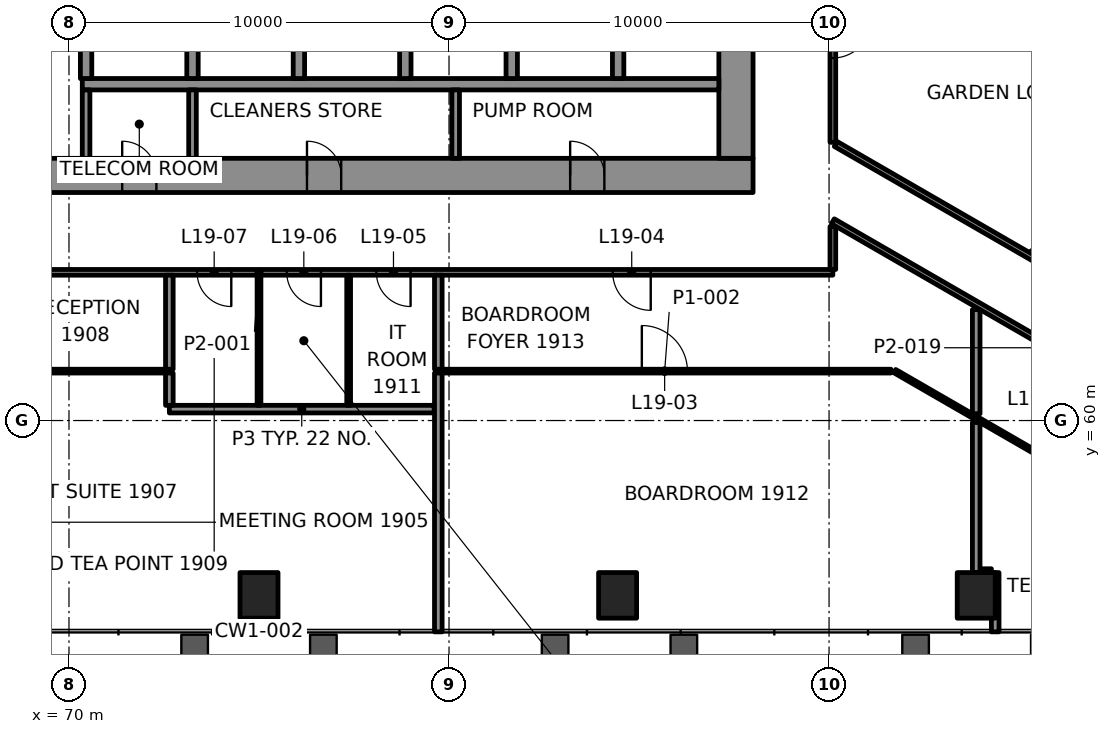
"""IFC4 building model, lengths in metres.
Left out: names, types, materials, properties, quantities, classifications, styles, units other than length and angle.
Written with IfcOpenShell. Run it as: python <this file> out.ifc"""

import sys

from ifc_helpers import new_model, si_unit, direction, frame, frame_2d, origin, origin_2d, place, context, subcontext, project, spatial, rectangle, extrude, element, fill, save


model = new_model("IFC4")
c1 = context("Model", 3, precision=1e-05, world=origin(), true_north=direction((0.0, 1.0)))
c2 = subcontext(c1, "Body", "Model", "MODEL_VIEW")
j1 = project(units=[si_unit("LENGTHUNIT", "METRE"), si_unit("PLANEANGLEUNIT", "RADIAN")], contexts=[c1])
p1 = place(None, origin())
s1 = spatial("IfcSite", under=j1, at=p1, CompositionType="ELEMENT")
p2 = place(p1, origin())
s2 = spatial("IfcBuilding", under=s1, at=p2, CompositionType="ELEMENT")
p3 = place(p2, frame((0.0, 0.0, 86.2)))
s3 = spatial("IfcBuildingStorey", under=s2, at=p3, CompositionType="ELEMENT", Elevation=86.2)
for number, where, z_axis, x_axis in (
    (1, (75.0, 55.399, -0.0), (0.0, 0.0, 1.0), (1.0, 0.0, 0.0)),
    (2, (84.436, 55.399, -0.0), (0.0, 0.0, 1.0), (1.0, 0.0, 0.0)),
    (3, (93.872, 55.399, -0.0), (0.0, 0.0, 1.0), (1.0, 0.0, 0.0)),
):
    element("IfcColumn", number, at=place(p3, frame(where, z_axis=z_axis, x_axis=x_axis)), inside=s3, PredefinedType="COLUMN", context=c2, shape_type="SweptSolid", body=[
        extrude(rectangle(XDim=1.0, YDim=1.2, at=origin_2d()), origin(), (0.0, 0.0, 1.0), 4.2),
    ])
p4 = place(p3, frame((62.0, 66.45, 0.0), z_axis=(0.0, 0.0, 1.0), x_axis=(1.0, 0.0, 0.0)))
e4 = element("IfcWall", 4, at=p4, inside=s3, PredefinedType="SHEAR", context=c2, shape_type="SweptSolid", body=[
    extrude(rectangle(XDim=26.0, YDim=0.9, at=frame_2d((13.0, 0.0))), origin(), (0.0, 0.0, 1.0), 4.0),
])
p5 = place(p4, frame((3.45, 0.0, 0.0)))
e5 = element("IfcOpeningElement", 5, at=p5, cuts=e4, PredefinedType="OPENING", context=c2, shape_type="SweptSolid", body=[
    extrude(rectangle(XDim=0.9, YDim=2.1, at=frame_2d((0.45, 1.05))), frame((0.0, 0.46, 0.0), z_axis=(0.0, -1.0, 0.0), x_axis=(1.0, 0.0, 0.0)), (0.0, 0.0, 1.0), 0.92),
])
p6 = place(p4, frame((6.425, 0.0, 0.0)))
e6 = element("IfcOpeningElement", 6, at=p6, cuts=e4, PredefinedType="OPENING", context=c2, shape_type="SweptSolid", body=[
    extrude(rectangle(XDim=0.9, YDim=2.1, at=frame_2d((0.45, 1.05))), frame((0.0, 0.46, 0.0), z_axis=(0.0, -1.0, 0.0), x_axis=(1.0, 0.0, 0.0)), (0.0, 0.0, 1.0), 0.92),
])
p7 = place(p4, frame((9.4, 0.0, 0.0)))
e7 = element("IfcOpeningElement", 7, at=p7, cuts=e4, PredefinedType="OPENING", context=c2, shape_type="SweptSolid", body=[
    extrude(rectangle(XDim=0.9, YDim=2.1, at=frame_2d((0.45, 1.05))), frame((0.0, 0.46, 0.0), z_axis=(0.0, -1.0, 0.0), x_axis=(1.0, 0.0, 0.0)), (0.0, 0.0, 1.0), 0.92),
])
p8 = place(p4, frame((14.262, 0.0, 0.0)))
e8 = element("IfcOpeningElement", 8, at=p8, cuts=e4, PredefinedType="OPENING", context=c2, shape_type="SweptSolid", body=[
    extrude(rectangle(XDim=0.9, YDim=2.1, at=frame_2d((0.45, 1.05))), frame((0.0, 0.46, 0.0), z_axis=(0.0, -1.0, 0.0), x_axis=(1.0, 0.0, 0.0)), (0.0, 0.0, 1.0), 0.92),
])
p9 = place(p4, frame((21.188, 0.0, 0.0)))
e9 = element("IfcOpeningElement", 9, at=p9, cuts=e4, PredefinedType="OPENING", context=c2, shape_type="SweptSolid", body=[
    extrude(rectangle(XDim=0.9, YDim=2.1, at=frame_2d((0.45, 1.05))), frame((0.0, 0.46, 0.0), z_axis=(0.0, -1.0, 0.0), x_axis=(1.0, 0.0, 0.0)), (0.0, 0.0, 1.0), 0.92),
])
p10 = place(p3, frame((87.55, 66.9, 0.0), z_axis=(0.0, 0.0, 1.0), x_axis=(0.0, 1.0, 0.0)))
e10 = element("IfcWall", 10, at=p10, inside=s3, PredefinedType="SHEAR", context=c2, shape_type="SweptSolid", body=[
    extrude(rectangle(XDim=16.2, YDim=0.9, at=frame_2d((8.1, 0.0))), origin(), (0.0, 0.0, 1.0), 4.0),
])
p11 = place(p10, frame((5.5, 0.0, 0.0)))
e11 = element("IfcOpeningElement", 11, at=p11, cuts=e10, PredefinedType="OPENING", context=c2, shape_type="SweptSolid", body=[
    extrude(rectangle(XDim=1.8, YDim=2.1, at=frame_2d((0.9, 1.05))), frame((0.0, 0.46, 0.0), z_axis=(0.0, -1.0, 0.0), x_axis=(1.0, 0.0, 0.0)), (0.0, 0.0, 1.0), 0.92),
])
p12 = place(p10, frame((11.738, 0.0, 0.0)))
e12 = element("IfcOpeningElement", 12, at=p12, cuts=e10, PredefinedType="OPENING", context=c2, shape_type="SweptSolid", body=[
    extrude(rectangle(XDim=0.9, YDim=2.1, at=frame_2d((0.45, 1.05))), frame((0.0, 0.46, 0.0), z_axis=(0.0, -1.0, 0.0), x_axis=(1.0, 0.0, 0.0)), (0.0, 0.0, 1.0), 0.92),
])
p13 = place(p3, frame((70.35, 68.85, 0.0), z_axis=(0.0, 0.0, 1.0), x_axis=(1.0, 0.0, 0.0)))
e13 = element("IfcWall", 13, at=p13, inside=s3, PredefinedType="SHEAR", context=c2, shape_type="SweptSolid", body=[
    extrude(rectangle(XDim=16.75, YDim=0.3, at=frame_2d((8.375, 0.0))), origin(), (0.0, 0.0, 1.0), 4.0),
])
for number, where, z_axis, x_axis in (
    (14, (70.45, 69.0, 0.0), (0.0, 0.0, 1.0), (0.0, 1.0, 0.0)),
    (15, (73.25, 69.0, 0.0), (0.0, 0.0, 1.0), (0.0, 1.0, 0.0)),
    (16, (76.05, 69.0, 0.0), (0.0, 0.0, 1.0), (0.0, 1.0, 0.0)),
    (17, (78.85, 69.0, 0.0), (0.0, 0.0, 1.0), (0.0, 1.0, 0.0)),
    (18, (81.65, 69.0, 0.0), (0.0, 0.0, 1.0), (0.0, 1.0, 0.0)),
    (19, (84.45, 69.0, 0.0), (0.0, 0.0, 1.0), (0.0, 1.0, 0.0)),
):
    element("IfcWall", number, at=place(p3, frame(where, z_axis=z_axis, x_axis=x_axis)), inside=s3, PredefinedType="SHEAR", context=c2, shape_type="SweptSolid", body=[
        extrude(rectangle(XDim=2.6, YDim=0.3, at=frame_2d((1.3, 0.0))), origin(), (0.0, 0.0, 1.0), 4.0),
    ])
p14 = place(p3, frame((93.972, 55.999, 0.0), z_axis=(0.0, 0.0, 1.0), x_axis=(1.0, 0.0, 0.0)))
e20 = element("IfcWall", 20, at=p14, inside=s3, PredefinedType="PARTITIONING", context=c2, shape_type="SweptSolid", body=[
    extrude(rectangle(XDim=0.299, YDim=0.2, at=frame_2d((0.15, 0.0))), origin(), (0.0, 0.0, 1.0), 3.4),
])
p15 = place(p3, frame((72.641, 60.3, 0.0), z_axis=(0.0, 0.0, 1.0), x_axis=(1.0, 0.0, 0.0)))
e21 = element("IfcWall", 21, at=p15, inside=s3, PredefinedType="PARTITIONING", context=c2, shape_type="SweptSolid", body=[
    extrude(rectangle(XDim=6.967, YDim=0.2, at=frame_2d((3.484, 0.0))), origin(), (0.0, 0.0, 1.0), 3.4),
])
p16 = place(p3, frame((58.271, 61.3, 0.0), z_axis=(0.0, 0.0, 1.0), x_axis=(1.0, 0.0, 0.0)))
e22 = element("IfcWall", 22, at=p16, inside=s3, PredefinedType="PARTITIONING", context=c2, shape_type="SweptSolid", body=[
    extrude(rectangle(XDim=14.37, YDim=0.1, at=frame_2d((7.185, 0.0))), origin(), (0.0, 0.0, 1.0), 3.4),
])
p17 = place(p16, frame((2.123, 0.0, 0.0)))
e23 = element("IfcOpeningElement", 23, at=p17, cuts=e22, PredefinedType="OPENING", context=c2, shape_type="SweptSolid", body=[
    extrude(rectangle(XDim=0.9, YDim=2.1, at=frame_2d((0.45, 1.05))), frame((0.0, 0.06, 0.0), z_axis=(0.0, -1.0, 0.0), x_axis=(1.0, 0.0, 0.0)), (0.0, 0.0, 1.0), 0.12),
])
p18 = place(p16, frame((9.052, 0.0, 0.0)))
e24 = element("IfcOpeningElement", 24, at=p18, cuts=e22, PredefinedType="OPENING", context=c2, shape_type="SweptSolid", body=[
    extrude(rectangle(XDim=1.0, YDim=2.1, at=frame_2d((0.5, 1.05))), frame((0.0, 0.06, 0.0), z_axis=(0.0, -1.0, 0.0), x_axis=(1.0, 0.0, 0.0)), (0.0, 0.0, 1.0), 0.12),
])
p19 = place(p3, frame((79.718, 61.3, 0.0), z_axis=(0.0, 0.0, 1.0), x_axis=(1.0, 0.0, 0.0)))
e25 = element("IfcWall", 25, at=p19, inside=s3, PredefinedType="PARTITIONING", context=c2, shape_type="SweptSolid", body=[
    extrude(rectangle(XDim=11.911, YDim=0.1, at=frame_2d((5.956, 0.0))), origin(), (0.0, 0.0, 1.0), 3.4),
])
p20 = place(p19, frame((5.355, 0.0, 0.0)))
e26 = element("IfcOpeningElement", 26, at=p20, cuts=e25, PredefinedType="OPENING", context=c2, shape_type="SweptSolid", body=[
    extrude(rectangle(XDim=1.2, YDim=2.1, at=frame_2d((0.6, 1.05))), frame((0.0, 0.06, 0.0), z_axis=(0.0, -1.0, 0.0), x_axis=(1.0, 0.0, 0.0)), (0.0, 0.0, 1.0), 0.12),
])
p21 = place(p3, frame((90.1, 63.9, 0.0), z_axis=(0.0, 0.0, 1.0), x_axis=(-1.0, 0.0, 0.0)))
e27 = element("IfcWall", 27, at=p21, inside=s3, PredefinedType="PARTITIONING", context=c2, shape_type="SweptSolid", body=[
    extrude(rectangle(XDim=30.2, YDim=0.15, at=frame_2d((15.1, 0.0))), origin(), (0.0, 0.0, 1.0), 3.4),
])
p22 = place(p21, frame((4.792, 0.0, 0.0)))
e28 = element("IfcOpeningElement", 28, at=p22, cuts=e27, PredefinedType="OPENING", context=c2, shape_type="SweptSolid", body=[
    extrude(rectangle(XDim=1.0, YDim=2.1, at=frame_2d((0.5, 1.05))), frame((0.0, 0.085, 0.0), z_axis=(0.0, -1.0, 0.0), x_axis=(1.0, 0.0, 0.0)), (0.0, 0.0, 1.0), 0.17),
])
p23 = place(p21, frame((11.111, 0.0, 0.0)))
e29 = element("IfcOpeningElement", 29, at=p23, cuts=e27, PredefinedType="OPENING", context=c2, shape_type="SweptSolid", body=[
    extrude(rectangle(XDim=0.9, YDim=2.1, at=frame_2d((0.45, 1.05))), frame((0.0, 0.085, 0.0), z_axis=(0.0, -1.0, 0.0), x_axis=(1.0, 0.0, 0.0)), (0.0, 0.0, 1.0), 0.17),
])
p24 = place(p21, frame((13.47, 0.0, 0.0)))
e30 = element("IfcOpeningElement", 30, at=p24, cuts=e27, PredefinedType="OPENING", context=c2, shape_type="SweptSolid", body=[
    extrude(rectangle(XDim=0.9, YDim=2.1, at=frame_2d((0.45, 1.05))), frame((0.0, 0.085, 0.0), z_axis=(0.0, -1.0, 0.0), x_axis=(1.0, 0.0, 0.0)), (0.0, 0.0, 1.0), 0.17),
])
p25 = place(p21, frame((15.83, 0.0, 0.0)))
e31 = element("IfcOpeningElement", 31, at=p25, cuts=e27, PredefinedType="OPENING", context=c2, shape_type="SweptSolid", body=[
    extrude(rectangle(XDim=0.9, YDim=2.1, at=frame_2d((0.45, 1.05))), frame((0.0, 0.085, 0.0), z_axis=(0.0, -1.0, 0.0), x_axis=(1.0, 0.0, 0.0)), (0.0, 0.0, 1.0), 0.17),
])
p26 = place(p21, frame((21.677, 0.0, 0.0)))
e32 = element("IfcOpeningElement", 32, at=p26, cuts=e27, PredefinedType="OPENING", context=c2, shape_type="SweptSolid", body=[
    extrude(rectangle(XDim=1.0, YDim=2.1, at=frame_2d((0.5, 1.05))), frame((0.0, 0.085, 0.0), z_axis=(0.0, -1.0, 0.0), x_axis=(1.0, 0.0, 0.0)), (0.0, 0.0, 1.0), 0.17),
])
p27 = place(p21, frame((27.946, 0.0, 0.0)))
e33 = element("IfcOpeningElement", 33, at=p27, cuts=e27, PredefinedType="OPENING", context=c2, shape_type="SweptSolid", body=[
    extrude(rectangle(XDim=1.0, YDim=2.1, at=frame_2d((0.5, 1.05))), frame((0.0, 0.085, 0.0), z_axis=(0.0, -1.0, 0.0), x_axis=(1.0, 0.0, 0.0)), (0.0, 0.0, 1.0), 0.17),
])
p28 = place(p3, frame((95.334, 64.416, 0.0), z_axis=(0.0, 0.0, 1.0), x_axis=(0.866026797969, 0.499997585193, 0.0)))
e34 = element("IfcWall", 34, at=p28, inside=s3, PredefinedType="PARTITIONING", context=c2, shape_type="SweptSolid", body=[
    extrude(rectangle(XDim=6.683, YDim=0.1, at=frame_2d((3.341, 0.0))), origin(), (0.0, 0.0, 1.0), 3.4),
])
p29 = place(p3, frame((94.372, 54.439, 0.0), z_axis=(0.0, 0.0, 1.0), x_axis=(0.0, 1.0, 0.0)))
e35 = element("IfcWall", 35, at=p29, inside=s3, PredefinedType="PARTITIONING", context=c2, shape_type="SweptSolid", body=[
    extrude(rectangle(XDim=1.56, YDim=0.2, at=frame_2d((0.78, 0.0))), origin(), (0.0, 0.0, 1.0), 3.4),
])
p30 = place(p3, frame((93.872, 55.999, 0.0), z_axis=(0.0, 0.0, 1.0), x_axis=(0.0, 1.0, 0.0)))
e36 = element("IfcWall", 36, at=p30, inside=s3, PredefinedType="PARTITIONING", context=c2, shape_type="SweptSolid", body=[
    extrude(rectangle(XDim=3.948, YDim=0.2, at=frame_2d((1.974, 0.0))), origin(), (0.0, 0.0, 1.0), 3.4),
])
p31 = place(p3, frame((90.1, 63.975, 0.0), z_axis=(0.0, 0.0, 1.0), x_axis=(0.0, 1.0, 0.0)))
e37 = element("IfcWall", 37, at=p31, inside=s3, PredefinedType="PARTITIONING", context=c2, shape_type="SweptSolid", body=[
    extrude(rectangle(XDim=1.131, YDim=0.15, at=frame_2d((0.565, 0.0))), origin(), (0.0, 0.0, 1.0), 3.247),
])
p32 = place(p3, frame((90.1, 86.1, 0.0), z_axis=(0.0, 0.0, 1.0), x_axis=(0.0, -1.0, 0.0)))
e38 = element("IfcWall", 38, at=p32, inside=s3, PredefinedType="PARTITIONING", context=c2, shape_type="SweptSolid", body=[
    extrude(rectangle(XDim=18.778, YDim=0.15, at=frame_2d((9.389, 0.0))), origin(), (0.0, 0.0, 1.0), 3.4),
])
p33 = place(p32, frame((7.462, 0.0, 0.0)))
e39 = element("IfcOpeningElement", 39, at=p33, cuts=e38, PredefinedType="OPENING", context=c2, shape_type="SweptSolid", body=[
    extrude(rectangle(XDim=1.0, YDim=2.1, at=frame_2d((0.5, 1.05))), frame((0.0, 0.085, 0.0), z_axis=(0.0, -1.0, 0.0), x_axis=(1.0, 0.0, 0.0)), (0.0, 0.0, 1.0), 0.17),
])
p34 = place(p32, frame((15.559, 0.0, 0.0)))
e40 = element("IfcOpeningElement", 40, at=p34, cuts=e38, PredefinedType="OPENING", context=c2, shape_type="SweptSolid", body=[
    extrude(rectangle(XDim=1.0, YDim=2.1, at=frame_2d((0.5, 1.05))), frame((0.0, 0.085, 0.0), z_axis=(0.0, -1.0, 0.0), x_axis=(1.0, 0.0, 0.0)), (0.0, 0.0, 1.0), 0.17),
])
p35 = place(p3, frame((79.718, 54.439, 0.0), z_axis=(0.0, 0.0, 1.0), x_axis=(0.0, 1.0, 0.0)))
e41 = element("IfcWall", 41, at=p35, inside=s3, PredefinedType="PARTITIONING", context=c2, shape_type="SweptSolid", body=[
    extrude(rectangle(XDim=6.811, YDim=0.2, at=frame_2d((3.405, 0.0))), origin(), (0.0, 0.0, 1.0), 3.165),
])
for number, where, z_axis, x_axis in (
    (42, (77.359, 60.4, 0.0), (0.0, 0.0, 1.0), (0.0, 1.0, 0.0)),
    (43, (75.0, 60.4, 0.0), (0.0, 0.0, 1.0), (0.0, 1.0, 0.0)),
):
    element("IfcWall", number, at=place(p3, frame(where, z_axis=z_axis, x_axis=x_axis)), inside=s3, PredefinedType="PARTITIONING", context=c2, shape_type="SweptSolid", body=[
        extrude(rectangle(XDim=3.425, YDim=0.1, at=frame_2d((1.712, 0.0))), origin(), (0.0, 0.0, 1.0), 3.4),
    ])
p36 = place(p3, frame((72.641, 60.4, 0.0), z_axis=(0.0, 0.0, 1.0), x_axis=(0.0, 1.0, 0.0)))
e44 = element("IfcWall", 44, at=p36, inside=s3, PredefinedType="PARTITIONING", context=c2, shape_type="SweptSolid", body=[
    extrude(rectangle(XDim=0.85, YDim=0.2, at=frame_2d((0.425, 0.0))), origin(), (0.0, 0.0, 1.0), 3.4),
])
p37 = place(p3, frame((90.175, 67.278, 0.0), z_axis=(0.0, 0.0, 1.0), x_axis=(0.866024530411, -0.500001512725, 0.0)))
e45 = element("IfcWall", 45, at=p37, inside=s3, PredefinedType="PARTITIONING", context=c2, shape_type="SweptSolid", body=[
    extrude(rectangle(XDim=14.263, YDim=0.15, at=frame_2d((7.131, 0.0))), origin(), (0.0, 0.0, 1.0), 3.4),
])
p38 = place(p37, frame((9.45, 0.0, 0.0)))
e46 = element("IfcOpeningElement", 46, at=p38, cuts=e45, PredefinedType="OPENING", context=c2, shape_type="SweptSolid", body=[
    extrude(rectangle(XDim=1.0, YDim=2.1, at=frame_2d((0.5, 1.05))), frame((0.0, 0.085, 0.0), z_axis=(0.0, -1.0, 0.0), x_axis=(1.0, 0.0, 0.0)), (0.0, 0.0, 1.0), 0.17),
])
p39 = place(p3, frame((101.627, 58.588, 0.0), z_axis=(0.0, 0.0, 1.0), x_axis=(-0.866025527764, 0.499999785261, 0.0)))
e47 = element("IfcWall", 47, at=p39, inside=s3, PredefinedType="PARTITIONING", context=c2, shape_type="SweptSolid", body=[
    extrude(rectangle(XDim=13.31, YDim=0.15, at=frame_2d((6.655, 0.0))), origin(), (0.0, 0.0, 1.0), 3.247),
])
p40 = place(p39, frame((4.079, 0.0, 0.0)))
e48 = element("IfcOpeningElement", 48, at=p40, cuts=e47, PredefinedType="OPENING", context=c2, shape_type="SweptSolid", body=[
    extrude(rectangle(XDim=1.0, YDim=2.1, at=frame_2d((0.5, 1.05))), frame((0.0, 0.085, 0.0), z_axis=(0.0, -1.0, 0.0), x_axis=(1.0, 0.0, 0.0)), (0.0, 0.0, 1.0), 0.17),
])
p41 = place(p3, frame((91.729, 61.3, 0.0), z_axis=(0.0, 0.0, 1.0), x_axis=(0.866025600504, -0.499999659272, 0.0)))
e49 = element("IfcWall", 49, at=p41, inside=s3, PredefinedType="PARTITIONING", context=c2, shape_type="SweptSolid", body=[
    extrude(rectangle(XDim=12.528, YDim=0.1, at=frame_2d((6.264, 0.0))), origin(), (0.0, 0.0, 1.0), 3.4),
])
p42 = place(p41, frame((6.902, 0.0, 0.0)))
e50 = element("IfcOpeningElement", 50, at=p42, cuts=e49, PredefinedType="OPENING", context=c2, shape_type="SweptSolid", body=[
    extrude(rectangle(XDim=1.0, YDim=2.1, at=frame_2d((0.5, 1.05))), frame((0.0, 0.06, 0.0), z_axis=(0.0, -1.0, 0.0), x_axis=(1.0, 0.0, 0.0)), (0.0, 0.0, 1.0), 0.12),
])
for number, where, z_axis, x_axis in (
    (51, (72.641, 61.35, 0.0), (0.0, 0.0, 1.0), (0.0, 1.0, 0.0)),
    (52, (79.718, 61.35, 0.0), (0.0, 0.0, 1.0), (0.0, 1.0, 0.0)),
):
    element("IfcWall", number, at=place(p3, frame(where, z_axis=z_axis, x_axis=x_axis)), inside=s3, PredefinedType="PARTITIONING", context=c2, shape_type="SweptSolid", body=[
        extrude(rectangle(XDim=2.475, YDim=0.2, at=frame_2d((1.237, 0.0))), origin(), (0.0, 0.0, 1.0), 3.4),
    ])
p43 = place(p3, frame((93.872, 60.178, 0.0), z_axis=(0.0, 0.0, 1.0), x_axis=(0.0, 1.0, 0.0)))
e53 = element("IfcWall", 53, at=p43, inside=s3, PredefinedType="PARTITIONING", context=c2, shape_type="SweptSolid", body=[
    extrude(rectangle(XDim=2.74, YDim=0.2, at=frame_2d((1.37, 0.0))), origin(), (0.0, 0.0, 1.0), 3.4),
])
for number, where, z_axis, x_axis in (
    (54, (70.45, 66.9, 0.0), (0.0, 0.0, 1.0), (0.0, 1.0, 0.0)),
    (55, (73.25, 66.9, 0.0), (0.0, 0.0, 1.0), (0.0, 1.0, 0.0)),
    (56, (80.175, 66.9, 0.0), (0.0, 0.0, 1.0), (0.0, 1.0, 0.0)),
):
    element("IfcWall", number, at=place(p3, frame(where, z_axis=z_axis, x_axis=x_axis)), inside=s3, PredefinedType="PARTITIONING", context=c2, shape_type="SweptSolid", body=[
        extrude(rectangle(XDim=1.8, YDim=0.2, at=frame_2d((0.9, 0.0))), origin(), (0.0, 0.0, 1.0), 4.0),
    ])
p44 = place(p20, origin())
e57 = element("IfcDoor", 57, at=p44, inside=s3, OperationType="DOUBLE_DOOR_SINGLE_SWING", PredefinedType="DOOR", context=c2, shape_type="SweptSolid", body=[
    extrude(rectangle(XDim=1.2, YDim=2.1, at=frame_2d((0.6, 1.05))), frame((0.0, 0.025, 0.0), z_axis=(0.0, -1.0, 0.0), x_axis=(1.0, 0.0, 0.0)), (0.0, 0.0, 1.0), 0.05),
])
fill(e26, e57)
p45 = place(p22, origin())
e58 = element("IfcDoor", 58, at=p45, inside=s3, OperationType="SINGLE_SWING_LEFT", PredefinedType="DOOR", context=c2, shape_type="SweptSolid", body=[
    extrude(rectangle(XDim=1.0, YDim=2.1, at=frame_2d((0.5, 1.05))), frame((0.0, 0.025, 0.0), z_axis=(0.0, -1.0, 0.0), x_axis=(1.0, 0.0, 0.0)), (0.0, 0.0, 1.0), 0.05),
])
fill(e28, e58)
p46 = place(p23, origin())
e59 = element("IfcDoor", 59, at=p46, inside=s3, OperationType="SINGLE_SWING_LEFT", PredefinedType="DOOR", context=c2, shape_type="SweptSolid", body=[
    extrude(rectangle(XDim=0.9, YDim=2.1, at=frame_2d((0.45, 1.05))), frame((0.0, 0.025, 0.0), z_axis=(0.0, -1.0, 0.0), x_axis=(1.0, 0.0, 0.0)), (0.0, 0.0, 1.0), 0.05),
])
fill(e29, e59)
p47 = place(p24, origin())
e60 = element("IfcDoor", 60, at=p47, inside=s3, OperationType="SINGLE_SWING_RIGHT", PredefinedType="DOOR", context=c2, shape_type="SweptSolid", body=[
    extrude(rectangle(XDim=0.9, YDim=2.1, at=frame_2d((0.45, 1.05))), frame((0.0, 0.025, 0.0), z_axis=(0.0, -1.0, 0.0), x_axis=(1.0, 0.0, 0.0)), (0.0, 0.0, 1.0), 0.05),
])
fill(e30, e60)
p48 = place(p25, origin())
e61 = element("IfcDoor", 61, at=p48, inside=s3, OperationType="SINGLE_SWING_LEFT", PredefinedType="DOOR", context=c2, shape_type="SweptSolid", body=[
    extrude(rectangle(XDim=0.9, YDim=2.1, at=frame_2d((0.45, 1.05))), frame((0.0, 0.025, 0.0), z_axis=(0.0, -1.0, 0.0), x_axis=(1.0, 0.0, 0.0)), (0.0, 0.0, 1.0), 0.05),
])
fill(e31, e61)
p49 = place(p34, origin())
e62 = element("IfcDoor", 62, at=p49, inside=s3, OperationType="SINGLE_SWING_LEFT", PredefinedType="DOOR", context=c2, shape_type="SweptSolid", body=[
    extrude(rectangle(XDim=1.0, YDim=2.1, at=frame_2d((0.5, 1.05))), frame((0.0, 0.025, 0.0), z_axis=(0.0, -1.0, 0.0), x_axis=(1.0, 0.0, 0.0)), (0.0, 0.0, 1.0), 0.05),
])
fill(e40, e62)
p50 = place(p7, origin())
e63 = element("IfcDoor", 63, at=p50, inside=s3, OperationType="SINGLE_SWING_LEFT", PredefinedType="DOOR", context=c2, shape_type="SweptSolid", body=[
    extrude(rectangle(XDim=0.9, YDim=2.1, at=frame_2d((0.45, 1.05))), frame((0.0, 0.17, 0.0), z_axis=(0.0, -1.0, 0.0), x_axis=(1.0, 0.0, 0.0)), (0.0, 0.0, 1.0), 0.34),
])
fill(e7, e63)
p51 = place(p8, origin())
e64 = element("IfcDoor", 64, at=p51, inside=s3, OperationType="SINGLE_SWING_RIGHT", PredefinedType="DOOR", context=c2, shape_type="SweptSolid", body=[
    extrude(rectangle(XDim=0.9, YDim=2.1, at=frame_2d((0.45, 1.05))), frame((0.0, 0.17, 0.0), z_axis=(0.0, -1.0, 0.0), x_axis=(1.0, 0.0, 0.0)), (0.0, 0.0, 1.0), 0.34),
])
fill(e8, e64)
p52 = place(p9, origin())
e65 = element("IfcDoor", 65, at=p52, inside=s3, OperationType="SINGLE_SWING_LEFT", PredefinedType="DOOR", context=c2, shape_type="SweptSolid", body=[
    extrude(rectangle(XDim=0.9, YDim=2.1, at=frame_2d((0.45, 1.05))), frame((0.0, 0.17, 0.0), z_axis=(0.0, -1.0, 0.0), x_axis=(1.0, 0.0, 0.0)), (0.0, 0.0, 1.0), 0.34),
])
fill(e9, e65)
save(model, sys.argv[1])
